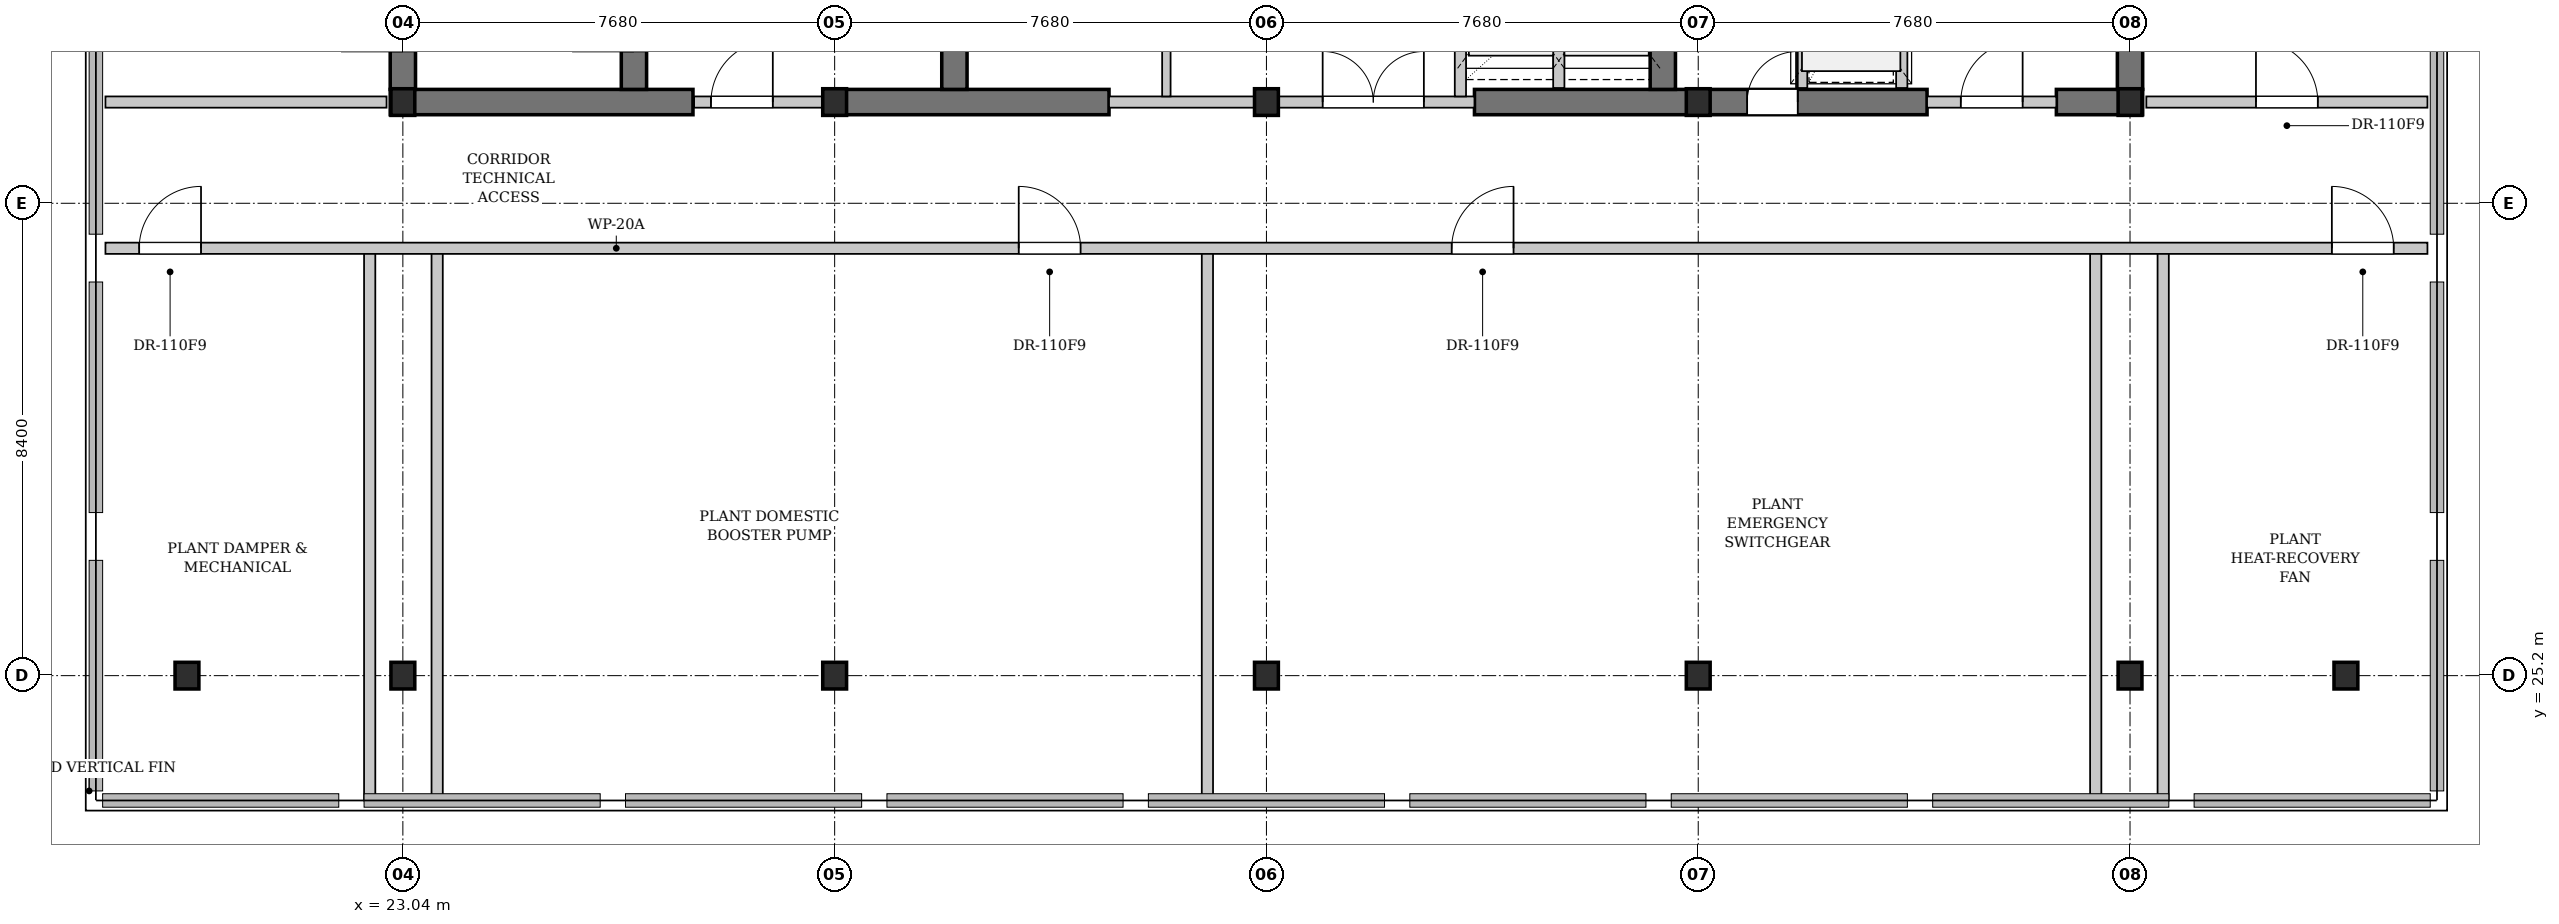
"""IFC4 building model, lengths in metres.
Left out: names, types, materials, properties, quantities, classifications, styles, units other than length and angle.
Written with IfcOpenShell. Run it as: python <this file> out.ifc"""

import sys

from ifc_helpers import new_model, si_unit, direction, frame, frame_2d, origin, origin_2d, place, context, subcontext, project, spatial, rectangle, i_section, extrude, element, fill, save


model = new_model("IFC4")
c1 = context("Model", 3, precision=1e-05, world=origin(), true_north=direction((0.0, 1.0)))
c2 = subcontext(c1, "Body", "Model", "MODEL_VIEW")
j1 = project(units=[si_unit("LENGTHUNIT", "METRE"), si_unit("PLANEANGLEUNIT", "RADIAN")], contexts=[c1])
p1 = place(None, origin())
s1 = spatial("IfcSite", under=j1, at=p1, CompositionType="ELEMENT")
p2 = place(p1, origin())
s2 = spatial("IfcBuilding", under=s1, at=p2, CompositionType="ELEMENT")
p3 = place(p2, frame((0.0, 0.0, 145.1)))
s3 = spatial("IfcBuildingStorey", under=s2, at=p3, CompositionType="ELEMENT", Elevation=145.1)
p4 = place(p3, frame((22.815, 35.4, 0.0), z_axis=(0.0, 0.0, 1.0), x_axis=(1.0, 0.0, 0.0)))
e1 = element("IfcWall", 1, at=p4, inside=s3, PredefinedType="SHEAR", context=c2, shape_type="SweptSolid", body=[
    extrude(rectangle(XDim=5.385, YDim=0.45, at=frame_2d((2.692, 0.0))), origin(), (0.0, 0.0, 1.0), 3.48),
])
p5 = place(p3, frame((30.72, 35.4, 0.0), z_axis=(0.0, 0.0, 1.0), x_axis=(1.0, 0.0, 0.0)))
e2 = element("IfcWall", 2, at=p5, inside=s3, PredefinedType="SHEAR", context=c2, shape_type="SweptSolid", body=[
    extrude(rectangle(XDim=4.88, YDim=0.45, at=frame_2d((2.44, 0.0))), origin(), (0.0, 0.0, 1.0), 3.48),
])
p6 = place(p3, frame((42.1, 35.4, 0.0), z_axis=(0.0, 0.0, 1.0), x_axis=(1.0, 0.0, 0.0)))
e3 = element("IfcWall", 3, at=p6, inside=s3, PredefinedType="SHEAR", context=c2, shape_type="SweptSolid", body=[
    extrude(rectangle(XDim=8.05, YDim=0.45, at=frame_2d((4.025, 0.0))), origin(), (0.0, 0.0, 1.0), 3.48),
])
p7 = place(p6, frame((4.85, 0.0, 0.0)))
e4 = element("IfcOpeningElement", 4, at=p7, cuts=e3, PredefinedType="OPENING", context=c2, shape_type="SweptSolid", body=[
    extrude(rectangle(XDim=0.9, YDim=2.15, at=frame_2d((0.45, 1.075))), frame((0.0, 0.235, 0.0), z_axis=(0.0, -1.0, 0.0), x_axis=(1.0, 0.0, 0.0)), (0.0, 0.0, 1.0), 0.47),
])
p8 = place(p3, frame((52.45, 35.4, 0.0), z_axis=(0.0, 0.0, 1.0), x_axis=(1.0, 0.0, 0.0)))
e5 = element("IfcWall", 5, at=p8, inside=s3, PredefinedType="SHEAR", context=c2, shape_type="SweptSolid", body=[
    extrude(rectangle(XDim=1.535, YDim=0.45, at=frame_2d((0.768, 0.0))), origin(), (0.0, 0.0, 1.0), 3.48),
])
p9 = place(p3, frame((23.04, 35.625, 0.0), z_axis=(0.0, 0.0, 1.0), x_axis=(0.0, 1.0, 0.0)))
e6 = element("IfcWall", 6, at=p9, inside=s3, PredefinedType="SHEAR", context=c2, shape_type="SweptSolid", body=[
    extrude(rectangle(XDim=10.35, YDim=0.45, at=frame_2d((5.175, 0.0))), origin(), (0.0, 0.0, 1.0), 3.48),
])
p10 = place(p9, frame((0.675, 0.0, 0.0)))
e7 = element("IfcOpeningElement", 7, at=p10, cuts=e6, PredefinedType="OPENING", context=c2, shape_type="SweptSolid", body=[
    extrude(rectangle(XDim=1.1, YDim=2.15, at=frame_2d((0.55, 1.075))), frame((0.0, 0.235, 0.0), z_axis=(0.0, -1.0, 0.0), x_axis=(1.0, 0.0, 0.0)), (0.0, 0.0, 1.0), 0.47),
])
p11 = place(p3, frame((27.15, 35.625, 0.0), z_axis=(0.0, 0.0, 1.0), x_axis=(0.0, 1.0, 0.0)))
e8 = element("IfcWall", 8, at=p11, inside=s3, PredefinedType="SHEAR", context=c2, shape_type="SweptSolid", body=[
    extrude(rectangle(XDim=10.35, YDim=0.45, at=frame_2d((5.175, 0.0))), origin(), (0.0, 0.0, 1.0), 3.48),
])
p12 = place(p11, frame((0.675, 0.0, 0.0)))
e9 = element("IfcOpeningElement", 9, at=p12, cuts=e8, PredefinedType="OPENING", context=c2, shape_type="SweptSolid", body=[
    extrude(rectangle(XDim=1.1, YDim=2.15, at=frame_2d((0.55, 1.075))), frame((0.0, 0.235, 0.0), z_axis=(0.0, -1.0, 0.0), x_axis=(1.0, 0.0, 0.0)), (0.0, 0.0, 1.0), 0.47),
])
for number, where, z_axis, x_axis in (
    (10, (32.85, 35.625, 0.0), (0.0, 0.0, 1.0), (0.0, 1.0, 0.0)),
    (11, (45.45, 35.625, 0.0), (0.0, 0.0, 1.0), (0.0, 1.0, 0.0)),
    (12, (53.76, 35.625, 0.0), (0.0, 0.0, 1.0), (0.0, 1.0, 0.0)),
):
    element("IfcWall", number, at=place(p3, frame(where, z_axis=z_axis, x_axis=x_axis)), inside=s3, PredefinedType="SHEAR", context=c2, shape_type="SweptSolid", body=[
        extrude(rectangle(XDim=10.35, YDim=0.45, at=frame_2d((5.175, 0.0))), origin(), (0.0, 0.0, 1.0), 3.48),
    ])
for number, where, z_axis, x_axis in (
    (13, (23.04, 35.4, 0.0), (0.0, 0.0, 1.0), (1.0, 0.0, 0.0)),
    (14, (23.04, 25.2, 0.0), (0.0, 0.0, 1.0), (1.0, 0.0, 0.0)),
    (15, (30.72, 35.4, 0.0), (0.0, 0.0, 1.0), (1.0, 0.0, 0.0)),
    (16, (30.72, 25.2, 0.0), (0.0, 0.0, 1.0), (1.0, 0.0, 0.0)),
    (17, (38.4, 35.4, 0.0), (0.0, 0.0, 1.0), (1.0, 0.0, 0.0)),
    (18, (38.4, 25.2, 0.0), (0.0, 0.0, 1.0), (1.0, 0.0, 0.0)),
    (19, (46.08, 35.4, 0.0), (0.0, 0.0, 1.0), (1.0, 0.0, 0.0)),
    (20, (46.08, 25.2, 0.0), (0.0, 0.0, 1.0), (1.0, 0.0, 0.0)),
    (21, (53.76, 35.4, 0.0), (0.0, 0.0, 1.0), (1.0, 0.0, 0.0)),
    (22, (53.76, 25.2, 0.0), (0.0, 0.0, 1.0), (1.0, 0.0, 0.0)),
    (23, (19.2, 25.2, 0.0), (0.0, 0.0, 1.0), (1.0, 0.0, 0.0)),
    (24, (57.6, 25.2, 0.0), (0.0, 0.0, 1.0), (1.0, 0.0, 0.0)),
):
    element("IfcColumn", number, at=place(p3, frame(where, z_axis=z_axis, x_axis=x_axis)), inside=s3, PredefinedType="COLUMN", context=c2, shape_type="SweptSolid", body=[
        extrude(i_section(OverallWidth=0.424, OverallDepth=0.474, WebThickness=0.047, FlangeThickness=0.077, FilletRadius=0.015, at=origin_2d()), origin(), (0.0, 0.0, 1.0), 3.9),
    ])
p13 = place(p3, frame((28.22, 35.4, 0.0), z_axis=(0.0, 0.0, 1.0), x_axis=(1.0, 0.0, 0.0)))
e25 = element("IfcWall", 25, at=p13, inside=s3, PredefinedType="PARTITIONING", context=c2, shape_type="SweptSolid", body=[
    extrude(rectangle(XDim=2.5, YDim=0.2, at=frame_2d((1.25, 0.0))), origin(), (0.0, 0.0, 1.0), 2.565),
])
p14 = place(p13, frame((0.3, 0.0, 0.0)))
e26 = element("IfcOpeningElement", 26, at=p14, cuts=e25, PredefinedType="OPENING", context=c2, shape_type="SweptSolid", body=[
    extrude(rectangle(XDim=1.1, YDim=2.15, at=frame_2d((0.55, 1.075))), frame((0.0, 0.11, 0.0), z_axis=(0.0, -1.0, 0.0), x_axis=(1.0, 0.0, 0.0)), (0.0, 0.0, 1.0), 0.22),
])
p15 = place(p3, frame((35.6, 35.4, 0.0), z_axis=(0.0, 0.0, 1.0), x_axis=(1.0, 0.0, 0.0)))
e27 = element("IfcWall", 27, at=p15, inside=s3, PredefinedType="PARTITIONING", context=c2, shape_type="SweptSolid", body=[
    extrude(rectangle(XDim=6.5, YDim=0.2, at=frame_2d((3.25, 0.0))), origin(), (0.0, 0.0, 1.0), 2.565),
])
p16 = place(p15, frame((3.8, 0.0, 0.0)))
e28 = element("IfcOpeningElement", 28, at=p16, cuts=e27, PredefinedType="OPENING", context=c2, shape_type="SweptSolid", body=[
    extrude(rectangle(XDim=1.8, YDim=2.3, at=frame_2d((0.9, 1.15))), frame((0.0, 0.11, 0.0), z_axis=(0.0, -1.0, 0.0), x_axis=(1.0, 0.0, 0.0)), (0.0, 0.0, 1.0), 0.22),
])
p17 = place(p3, frame((36.62, 35.5, 0.0), z_axis=(0.0, 0.0, 1.0), x_axis=(0.0, 1.0, 0.0)))
e29 = element("IfcWall", 29, at=p17, inside=s3, PredefinedType="PARTITIONING", context=c2, shape_type="SweptSolid", body=[
    extrude(rectangle(XDim=10.42, YDim=0.15, at=frame_2d((5.21, 0.0))), origin(), (0.0, 0.0, 1.0), 3.48),
])
p18 = place(p17, frame((3.92, 0.0, 0.0)))
e30 = element("IfcOpeningElement", 30, at=p18, cuts=e29, PredefinedType="OPENING", context=c2, shape_type="SweptSolid", body=[
    extrude(rectangle(XDim=0.9, YDim=2.15, at=frame_2d((0.45, 1.075))), frame((0.0, 0.085, 0.0), z_axis=(0.0, -1.0, 0.0), x_axis=(1.0, 0.0, 0.0)), (0.0, 0.0, 1.0), 0.17),
])
p19 = place(p17, frame((5.85, 0.0, 0.0)))
e31 = element("IfcOpeningElement", 31, at=p19, cuts=e29, PredefinedType="OPENING", context=c2, shape_type="SweptSolid", body=[
    extrude(rectangle(XDim=0.9, YDim=2.15, at=frame_2d((0.45, 1.075))), frame((0.0, 0.085, 0.0), z_axis=(0.0, -1.0, 0.0), x_axis=(1.0, 0.0, 0.0)), (0.0, 0.0, 1.0), 0.17),
])
p20 = place(p3, frame((43.6, 35.65, 0.0), z_axis=(0.0, 0.0, 1.0), x_axis=(0.0, 1.0, 0.0)))
e32 = element("IfcWall", 32, at=p20, inside=s3, PredefinedType="PARTITIONING", context=c2, shape_type="SweptSolid", body=[
    extrude(rectangle(XDim=3.25, YDim=0.2, at=frame_2d((1.625, 0.0))), origin(), (0.0, 0.0, 1.0), 3.48),
])
p21 = place(p3, frame((41.85, 35.5, 0.0), z_axis=(0.0, 0.0, 1.0), x_axis=(0.0, 1.0, 0.0)))
e33 = element("IfcWall", 33, at=p21, inside=s3, PredefinedType="PARTITIONING", context=c2, shape_type="SweptSolid", body=[
    extrude(rectangle(XDim=3.4, YDim=0.2, at=frame_2d((1.7, 0.0))), origin(), (0.0, 0.0, 1.0), 3.48),
])
p22 = place(p3, frame((50.15, 35.4, 0.0), z_axis=(0.0, 0.0, 1.0), x_axis=(1.0, 0.0, 0.0)))
e34 = element("IfcWall", 34, at=p22, inside=s3, PredefinedType="PARTITIONING", context=c2, shape_type="SweptSolid", body=[
    extrude(rectangle(XDim=2.3, YDim=0.2, at=frame_2d((1.15, 0.0))), origin(), (0.0, 0.0, 1.0), 2.565),
])
p23 = place(p22, frame((0.6, 0.0, 0.0)))
e35 = element("IfcOpeningElement", 35, at=p23, cuts=e34, PredefinedType="OPENING", context=c2, shape_type="SweptSolid", body=[
    extrude(rectangle(XDim=1.1, YDim=2.15, at=frame_2d((0.55, 1.075))), frame((0.0, 0.11, 0.0), z_axis=(0.0, -1.0, 0.0), x_axis=(1.0, 0.0, 0.0)), (0.0, 0.0, 1.0), 0.22),
])
p24 = place(p3, frame((49.7, 35.65, 0.0), z_axis=(0.0, 0.0, 1.0), x_axis=(0.0, 1.0, 0.0)))
e36 = element("IfcWall", 36, at=p24, inside=s3, PredefinedType="PARTITIONING", context=c2, shape_type="SweptSolid", body=[
    extrude(rectangle(XDim=3.15, YDim=0.2, at=frame_2d((1.575, 0.0))), origin(), (0.0, 0.0, 1.0), 3.48),
])
p25 = place(p24, frame((0.85, 0.0, 0.0)))
e37 = element("IfcOpeningElement", 37, at=p25, cuts=e36, PredefinedType="OPENING", context=c2, shape_type="SweptSolid", body=[
    extrude(rectangle(XDim=1.2, YDim=2.2, at=frame_2d((0.6, 1.1))), frame((0.0, 0.11, 0.0), z_axis=(0.0, -1.0, 0.0), x_axis=(1.0, 0.0, 0.0)), (0.0, 0.0, 1.0), 0.22),
])
p26 = place(p3, frame((47.92, 35.65, 0.0), z_axis=(0.0, 0.0, 1.0), x_axis=(0.0, 1.0, 0.0)))
e38 = element("IfcWall", 38, at=p26, inside=s3, PredefinedType="PARTITIONING", context=c2, shape_type="SweptSolid", body=[
    extrude(rectangle(XDim=3.15, YDim=0.2, at=frame_2d((1.575, 0.0))), origin(), (0.0, 0.0, 1.0), 3.48),
])
p27 = place(p3, frame((17.75, 35.4, 0.0), z_axis=(0.0, 0.0, 1.0), x_axis=(1.0, 0.0, 0.0)))
e39 = element("IfcWall", 39, at=p27, inside=s3, PredefinedType="PARTITIONING", context=c2, shape_type="SweptSolid", body=[
    extrude(rectangle(XDim=5.0, YDim=0.2, at=frame_2d((2.5, 0.0))), origin(), (0.0, 0.0, 1.0), 3.48),
])
p28 = place(p3, frame((54.05, 35.4, 0.0), z_axis=(0.0, 0.0, 1.0), x_axis=(1.0, 0.0, 0.0)))
e40 = element("IfcWall", 40, at=p28, inside=s3, PredefinedType="PARTITIONING", context=c2, shape_type="SweptSolid", body=[
    extrude(rectangle(XDim=5.0, YDim=0.2, at=frame_2d((2.5, 0.0))), origin(), (0.0, 0.0, 1.0), 3.48),
])
p29 = place(p28, frame((1.95, 0.0, 0.0)))
e41 = element("IfcOpeningElement", 41, at=p29, cuts=e40, PredefinedType="OPENING", context=c2, shape_type="SweptSolid", body=[
    extrude(rectangle(XDim=1.1, YDim=2.15, at=frame_2d((0.55, 1.075))), frame((0.0, 0.11, 0.0), z_axis=(0.0, -1.0, 0.0), x_axis=(1.0, 0.0, 0.0)), (0.0, 0.0, 1.0), 0.22),
])
p30 = place(p3, frame((22.45, 22.98, 0.0), z_axis=(0.0, 0.0, 1.0), x_axis=(0.0, 1.0, 0.0)))
e42 = element("IfcWall", 42, at=p30, inside=s3, PredefinedType="PARTITIONING", context=c2, shape_type="SweptSolid", body=[
    extrude(rectangle(XDim=9.82, YDim=0.2, at=frame_2d((4.91, 0.0))), origin(), (0.0, 0.0, 1.0), 2.275),
])
for number, where, z_axis, x_axis in (
    (43, (23.65, 22.98, 0.0), (0.0, 0.0, 1.0), (0.0, 1.0, 0.0)),
    (44, (37.35, 22.98, 0.0), (0.0, 0.0, 1.0), (0.0, 1.0, 0.0)),
    (45, (53.15, 22.98, 0.0), (0.0, 0.0, 1.0), (0.0, 1.0, 0.0)),
):
    element("IfcWall", number, at=place(p3, frame(where, z_axis=z_axis, x_axis=x_axis)), inside=s3, PredefinedType="PARTITIONING", context=c2, shape_type="SweptSolid", body=[
        extrude(rectangle(XDim=9.82, YDim=0.2, at=frame_2d((4.91, 0.0))), origin(), (0.0, 0.0, 1.0), 3.48),
    ])
p31 = place(p3, frame((54.35, 22.98, 0.0), z_axis=(0.0, 0.0, 1.0), x_axis=(0.0, 1.0, 0.0)))
e46 = element("IfcWall", 46, at=p31, inside=s3, PredefinedType="PARTITIONING", context=c2, shape_type="SweptSolid", body=[
    extrude(rectangle(XDim=9.82, YDim=0.2, at=frame_2d((4.91, 0.0))), origin(), (0.0, 0.0, 1.0), 2.275),
])
p32 = place(p3, frame((17.75, 32.8, 0.0), z_axis=(0.0, 0.0, 1.0), x_axis=(1.0, 0.0, 0.0)))
e47 = element("IfcWall", 47, at=p32, inside=s3, PredefinedType="PARTITIONING", context=c2, shape_type="SweptSolid", body=[
    extrude(rectangle(XDim=41.3, YDim=0.2, at=frame_2d((20.65, 0.0))), origin(), (0.0, 0.0, 1.0), 3.48),
])
p33 = place(p32, frame((0.6, 0.0, 0.0)))
e48 = element("IfcOpeningElement", 48, at=p33, cuts=e47, PredefinedType="OPENING", context=c2, shape_type="SweptSolid", body=[
    extrude(rectangle(XDim=1.1, YDim=2.15, at=frame_2d((0.55, 1.075))), frame((0.0, 0.11, 0.0), z_axis=(0.0, -1.0, 0.0), x_axis=(1.0, 0.0, 0.0)), (0.0, 0.0, 1.0), 0.22),
])
p34 = place(p32, frame((16.244, 0.0, 0.0)))
e49 = element("IfcOpeningElement", 49, at=p34, cuts=e47, PredefinedType="OPENING", context=c2, shape_type="SweptSolid", body=[
    extrude(rectangle(XDim=1.1, YDim=2.15, at=frame_2d((0.55, 1.075))), frame((0.0, 0.11, 0.0), z_axis=(0.0, -1.0, 0.0), x_axis=(1.0, 0.0, 0.0)), (0.0, 0.0, 1.0), 0.22),
])
p35 = place(p32, frame((23.945, 0.0, 0.0)))
e50 = element("IfcOpeningElement", 50, at=p35, cuts=e47, PredefinedType="OPENING", context=c2, shape_type="SweptSolid", body=[
    extrude(rectangle(XDim=1.1, YDim=2.15, at=frame_2d((0.55, 1.075))), frame((0.0, 0.11, 0.0), z_axis=(0.0, -1.0, 0.0), x_axis=(1.0, 0.0, 0.0)), (0.0, 0.0, 1.0), 0.22),
])
p36 = place(p32, frame((39.6, 0.0, 0.0)))
e51 = element("IfcOpeningElement", 51, at=p36, cuts=e47, PredefinedType="OPENING", context=c2, shape_type="SweptSolid", body=[
    extrude(rectangle(XDim=1.1, YDim=2.15, at=frame_2d((0.55, 1.075))), frame((0.0, 0.11, 0.0), z_axis=(0.0, -1.0, 0.0), x_axis=(1.0, 0.0, 0.0)), (0.0, 0.0, 1.0), 0.22),
])
p37 = place(p14, origin())
e52 = element("IfcDoor", 52, at=p37, inside=s3, OperationType="SINGLE_SWING_RIGHT", PredefinedType="DOOR", context=c2, shape_type="SweptSolid", body=[
    extrude(rectangle(XDim=1.1, YDim=2.15, at=frame_2d((0.55, 1.075))), frame((0.0, 0.025, 0.0), z_axis=(0.0, -1.0, 0.0), x_axis=(1.0, 0.0, 0.0)), (0.0, 0.0, 1.0), 0.05),
])
fill(e26, e52)
p38 = place(p16, origin())
e53 = element("IfcDoor", 53, at=p38, inside=s3, OperationType="DOUBLE_DOOR_SINGLE_SWING", PredefinedType="DOOR", context=c2, shape_type="SweptSolid", body=[
    extrude(rectangle(XDim=1.8, YDim=2.3, at=frame_2d((0.9, 1.15))), frame((0.0, 0.025, 0.0), z_axis=(0.0, -1.0, 0.0), x_axis=(1.0, 0.0, 0.0)), (0.0, 0.0, 1.0), 0.05),
])
fill(e28, e53)
p39 = place(p23, origin())
e54 = element("IfcDoor", 54, at=p39, inside=s3, OperationType="SINGLE_SWING_RIGHT", PredefinedType="DOOR", context=c2, shape_type="SweptSolid", body=[
    extrude(rectangle(XDim=1.1, YDim=2.15, at=frame_2d((0.55, 1.075))), frame((0.0, 0.025, 0.0), z_axis=(0.0, -1.0, 0.0), x_axis=(1.0, 0.0, 0.0)), (0.0, 0.0, 1.0), 0.05),
])
fill(e35, e54)
p40 = place(p29, origin())
e55 = element("IfcDoor", 55, at=p40, inside=s3, OperationType="SINGLE_SWING_LEFT", PredefinedType="DOOR", context=c2, shape_type="SweptSolid", body=[
    extrude(rectangle(XDim=1.1, YDim=2.15, at=frame_2d((0.55, 1.075))), frame((0.0, 0.025, 0.0), z_axis=(0.0, -1.0, 0.0), x_axis=(1.0, 0.0, 0.0)), (0.0, 0.0, 1.0), 0.05),
])
fill(e41, e55)
p41 = place(p33, origin())
e56 = element("IfcDoor", 56, at=p41, inside=s3, OperationType="SINGLE_SWING_RIGHT", PredefinedType="DOOR", context=c2, shape_type="SweptSolid", body=[
    extrude(rectangle(XDim=1.1, YDim=2.15, at=frame_2d((0.55, 1.075))), frame((0.0, 0.025, 0.0), z_axis=(0.0, -1.0, 0.0), x_axis=(1.0, 0.0, 0.0)), (0.0, 0.0, 1.0), 0.05),
])
fill(e48, e56)
p42 = place(p34, origin())
e57 = element("IfcDoor", 57, at=p42, inside=s3, OperationType="SINGLE_SWING_LEFT", PredefinedType="DOOR", context=c2, shape_type="SweptSolid", body=[
    extrude(rectangle(XDim=1.1, YDim=2.15, at=frame_2d((0.55, 1.075))), frame((0.0, 0.025, 0.0), z_axis=(0.0, -1.0, 0.0), x_axis=(1.0, 0.0, 0.0)), (0.0, 0.0, 1.0), 0.05),
])
fill(e49, e57)
p43 = place(p35, origin())
e58 = element("IfcDoor", 58, at=p43, inside=s3, OperationType="SINGLE_SWING_RIGHT", PredefinedType="DOOR", context=c2, shape_type="SweptSolid", body=[
    extrude(rectangle(XDim=1.1, YDim=2.15, at=frame_2d((0.55, 1.075))), frame((0.0, 0.025, 0.0), z_axis=(0.0, -1.0, 0.0), x_axis=(1.0, 0.0, 0.0)), (0.0, 0.0, 1.0), 0.05),
])
fill(e50, e58)
p44 = place(p36, origin())
e59 = element("IfcDoor", 59, at=p44, inside=s3, OperationType="SINGLE_SWING_LEFT", PredefinedType="DOOR", context=c2, shape_type="SweptSolid", body=[
    extrude(rectangle(XDim=1.1, YDim=2.15, at=frame_2d((0.55, 1.075))), frame((0.0, 0.025, 0.0), z_axis=(0.0, -1.0, 0.0), x_axis=(1.0, 0.0, 0.0)), (0.0, 0.0, 1.0), 0.05),
])
fill(e51, e59)
p45 = place(p7, origin())
e60 = element("IfcDoor", 60, at=p45, inside=s3, OperationType="SINGLE_SWING_RIGHT", PredefinedType="DOOR", context=c2, shape_type="SweptSolid", body=[
    extrude(rectangle(XDim=0.9, YDim=2.15, at=frame_2d((0.45, 1.075))), frame((0.0, 0.025, 0.0), z_axis=(0.0, -1.0, 0.0), x_axis=(1.0, 0.0, 0.0)), (0.0, 0.0, 1.0), 0.05),
])
fill(e4, e60)
save(model, sys.argv[1])
